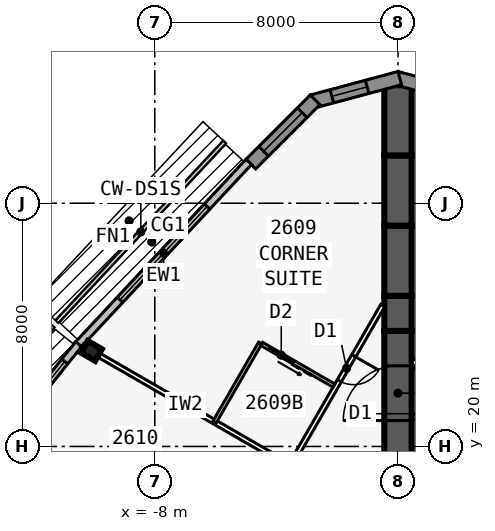
"""IFC4 building model, lengths in metres.
Left out: names, types, materials, properties, quantities, classifications, styles, units other than length and angle.
Written with IfcOpenShell. Run it as: python <this file> out.ifc"""

import sys

from ifc_helpers import new_model, si_unit, direction, frame, frame_2d, origin, origin_2d, place, context, subcontext, project, spatial, polyline, rectangle, i_section, outline, extrude, element, fill, save


model = new_model("IFC4")
c1 = context("Model", 3, precision=1e-05, world=origin(), true_north=direction((0.0, 1.0)))
c2 = subcontext(c1, "Body", "Model", "MODEL_VIEW")
j1 = project(units=[si_unit("LENGTHUNIT", "METRE"), si_unit("PLANEANGLEUNIT", "RADIAN")], contexts=[c1])
p1 = place(None, origin())
s1 = spatial("IfcSite", under=j1, at=p1, CompositionType="ELEMENT")
p2 = place(p1, origin())
s2 = spatial("IfcBuilding", under=s1, at=p2, CompositionType="ELEMENT")
p3 = place(p2, frame((0.0, 0.0, 99.9)))
s3 = spatial("IfcBuildingStorey", under=s2, at=p3, CompositionType="ELEMENT", Elevation=99.9)
p4 = place(p3, frame((0.0, 19.052, 0.0), z_axis=(0.0, 0.0, 1.0), x_axis=(0.0, 1.0, 0.0)))
e1 = element("IfcWall", 1, at=p4, inside=s3, PredefinedType="SHEAR", context=c2, shape_type="SweptSolid", body=[
    extrude(rectangle(XDim=4.746, YDim=0.9, at=frame_2d((2.373, 0.0))), origin(), (0.0, 0.0, 1.0), 3.4),
])
p5 = place(p4, frame((1.8, 0.0, 0.0)))
e2 = element("IfcOpeningElement", 2, at=p5, cuts=e1, PredefinedType="OPENING", context=c2, shape_type="SweptSolid", body=[
    extrude(rectangle(XDim=1.8, YDim=2.13, at=frame_2d((0.9, 1.065))), frame((0.0, 0.46, 0.0), z_axis=(0.0, -1.0, 0.0), x_axis=(1.0, 0.0, 0.0)), (0.0, 0.0, 1.0), 0.92),
])
p6 = place(p3, frame((0.0, 23.799, 0.0), z_axis=(0.0, 0.0, 1.0), x_axis=(0.0, 1.0, 0.0)))
e3 = element("IfcWall", 3, at=p6, inside=s3, PredefinedType="SHEAR", context=c2, shape_type="SweptSolid", body=[
    extrude(rectangle(XDim=1.155, YDim=0.9, at=frame_2d((0.577, 0.0))), origin(), (0.0, 0.0, 1.0), 3.4),
])
p7 = place(p3, frame((0.0, 24.953, 0.0), z_axis=(0.0, 0.0, 1.0), x_axis=(0.0, 1.0, 0.0)))
e4 = element("IfcWall", 4, at=p7, inside=s3, PredefinedType="SHEAR", context=c2, shape_type="SweptSolid", body=[
    extrude(rectangle(XDim=2.309, YDim=0.9, at=frame_2d((1.155, 0.0))), origin(), (0.0, 0.0, 1.0), 3.4),
])
p8 = place(p3, frame((0.0, 27.263, 0.0), z_axis=(0.0, 0.0, 1.0), x_axis=(0.0, 1.0, 0.0)))
e5 = element("IfcWall", 5, at=p8, inside=s3, PredefinedType="SHEAR", context=c2, shape_type="SweptSolid", body=[
    extrude(rectangle(XDim=2.31, YDim=0.9, at=frame_2d((1.155, 0.0))), origin(), (0.0, 0.0, 1.0), 3.4),
])
p9 = place(p3, frame((0.0, 29.572, 0.0), z_axis=(0.0, 0.0, 1.0), x_axis=(0.0, 1.0, 0.0)))
e6 = element("IfcWall", 6, at=p9, inside=s3, PredefinedType="SHEAR", context=c2, shape_type="SweptSolid", body=[
    extrude(rectangle(XDim=2.309, YDim=0.9, at=frame_2d((1.155, 0.0))), origin(), (0.0, 0.0, 1.0), 3.4),
])
p10 = place(p3, frame((-10.083, 23.142, 0.0), z_axis=(0.0, 0.0, 1.0), x_axis=(-0.5, -0.866025403784, 0.0)))
e7 = element("IfcColumn", 7, at=p10, inside=s3, PredefinedType="COLUMN", context=c2, shape_type="SweptSolid", body=[
    extrude(i_section(OverallWidth=0.442, OverallDepth=0.531, WebThickness=0.066, FlangeThickness=0.106, at=origin_2d()), origin(), (0.0, 0.0, 1.0), 3.4),
])
p11 = place(p3, frame((2.829, 31.341, 0.0), z_axis=(0.0, 0.0, 1.0), x_axis=(-0.965930548995, 0.258801419081, 0.0)))
e8 = element("IfcWall", 8, at=p11, inside=s3, PredefinedType="SOLIDWALL", context=c2, shape_type="SweptSolid", body=[
    extrude(outline(polyline([(2.989, 0.225), (2.929, 0.225), (2.438, 0.093), (2.402, 0.225), (0.0, 0.225), (0.0, -0.225), (2.989, -0.225), (2.989, 0.225)])), origin(), (0.0, 0.0, 1.0), 3.15),
])
p12 = place(p11, frame((0.676, 0.0, 0.45)))
e9 = element("IfcOpeningElement", 9, at=p12, cuts=e8, PredefinedType="OPENING", context=c2, shape_type="SweptSolid", body=[
    extrude(rectangle(XDim=1.2, YDim=2.4, at=frame_2d((0.6, 1.2))), frame((0.0, 0.235, 0.0), z_axis=(0.0, -1.0, 0.0), x_axis=(1.0, 0.0, 0.0)), (0.0, 0.0, 1.0), 0.47),
])
p13 = place(p3, frame((0.058, 32.114, 0.0), z_axis=(0.0, 0.0, 1.0), x_axis=(-0.965930548995, -0.258801419081, 0.0)))
e10 = element("IfcWall", 10, at=p13, inside=s3, PredefinedType="SOLIDWALL", context=c2, shape_type="SweptSolid", body=[
    extrude(outline(polyline([(2.989, 0.225), (0.586, 0.225), (0.551, 0.093), (0.059, 0.225), (0.0, 0.225), (0.0, -0.225), (2.989, -0.225), (2.989, 0.225)])), origin(), (0.0, 0.0, 1.0), 3.15),
])
p14 = place(p13, frame((1.113, 0.0, 0.45)))
e11 = element("IfcOpeningElement", 11, at=p14, cuts=e10, PredefinedType="OPENING", context=c2, shape_type="SweptSolid", body=[
    extrude(rectangle(XDim=1.2, YDim=2.4, at=frame_2d((0.6, 1.2))), frame((0.0, 0.235, 0.0), z_axis=(0.0, -1.0, 0.0), x_axis=(1.0, 0.0, 0.0)), (0.0, 0.0, 1.0), 0.47),
])
p15 = place(p3, frame((-2.728, 31.399, 0.0), z_axis=(0.0, 0.0, 1.0), x_axis=(-0.707106781187, -0.707106781187, 0.0)))
e12 = element("IfcWall", 12, at=p15, inside=s3, PredefinedType="SOLIDWALL", context=c2, shape_type="SweptSolid", body=[
    extrude(rectangle(XDim=2.988, YDim=0.45, at=frame_2d((1.494, 0.0))), origin(), (0.0, 0.0, 1.0), 3.15),
])
p16 = place(p15, frame((0.594, 0.0, 0.45)))
e13 = element("IfcOpeningElement", 13, at=p16, cuts=e12, PredefinedType="OPENING", context=c2, shape_type="SweptSolid", body=[
    extrude(rectangle(XDim=1.8, YDim=2.4, at=frame_2d((0.9, 1.2))), frame((0.0, 0.235, 0.0), z_axis=(0.0, -1.0, 0.0), x_axis=(1.0, 0.0, 0.0)), (0.0, 0.0, 1.0), 0.47),
])
p17 = place(p3, frame((-4.909, 29.36, 0.0), z_axis=(0.0, 0.0, 1.0), x_axis=(-0.682289646561, -0.731081964075, 0.0)))
e14 = element("IfcWall", 14, at=p17, inside=s3, PredefinedType="STANDARD", context=c2, shape_type="SweptSolid", body=[
    extrude(rectangle(XDim=8.211, YDim=0.25, at=frame_2d((4.105, 0.0))), origin(), (0.0, 0.0, 1.0), 3.15),
])
p18 = place(p17, frame((2.006, 0.0, 0.45)))
e15 = element("IfcOpeningElement", 15, at=p18, cuts=e14, PredefinedType="OPENING", context=c2, shape_type="SweptSolid", body=[
    extrude(rectangle(XDim=4.2, YDim=2.4, at=frame_2d((2.1, 1.2))), frame((0.0, 0.135, 0.0), z_axis=(0.0, -1.0, 0.0), x_axis=(1.0, 0.0, 0.0)), (0.0, 0.0, 1.0), 0.27),
])
p19 = place(p3, frame((-10.505, 23.364, 0.0), z_axis=(0.0, 0.0, 1.0), x_axis=(-0.624594965756, -0.780948864364, 0.0)))
e16 = element("IfcWall", 16, at=p19, inside=s3, PredefinedType="STANDARD", context=c2, shape_type="SweptSolid", body=[
    extrude(rectangle(XDim=5.058, YDim=0.25, at=frame_2d((2.529, 0.0))), origin(), (0.0, 0.0, 1.0), 3.15),
])
p20 = place(p19, frame((0.729, 0.0, 0.45)))
e17 = element("IfcOpeningElement", 17, at=p20, cuts=e16, PredefinedType="OPENING", context=c2, shape_type="SweptSolid", body=[
    extrude(rectangle(XDim=3.6, YDim=2.4, at=frame_2d((1.8, 1.2))), frame((0.0, 0.135, 0.0), z_axis=(0.0, -1.0, 0.0), x_axis=(1.0, 0.0, 0.0)), (0.0, 0.0, 1.0), 0.27),
])
p21 = place(p3, frame((20.027, -10.985, 0.0), z_axis=(0.0, 0.0, 1.0), x_axis=(-0.500001677587, 0.866024435227, 0.0)))
e18 = element("IfcWall", 18, at=p21, inside=s3, PredefinedType="PARTITIONING", context=c2, shape_type="SweptSolid", body=[
    extrude(rectangle(XDim=39.054, YDim=0.15, at=frame_2d((19.527, 0.0))), origin(), (0.0, 0.0, 1.0), 3.15),
])
p22 = place(p21, frame((1.558, 0.0, 0.0)))
e19 = element("IfcOpeningElement", 19, at=p22, cuts=e18, PredefinedType="OPENING", context=c2, shape_type="SweptSolid", body=[
    extrude(rectangle(XDim=0.95, YDim=2.13, at=frame_2d((0.475, 1.065))), frame((0.0, 0.085, 0.0), z_axis=(0.0, -1.0, 0.0), x_axis=(1.0, 0.0, 0.0)), (0.0, 0.0, 1.0), 0.17),
])
p23 = place(p21, frame((11.552, 0.0, 0.0)))
e20 = element("IfcOpeningElement", 20, at=p23, cuts=e18, PredefinedType="OPENING", context=c2, shape_type="SweptSolid", body=[
    extrude(rectangle(XDim=0.95, YDim=2.13, at=frame_2d((0.475, 1.065))), frame((0.0, 0.085, 0.0), z_axis=(0.0, -1.0, 0.0), x_axis=(1.0, 0.0, 0.0)), (0.0, 0.0, 1.0), 0.17),
])
p24 = place(p21, frame((22.752, 0.0, 0.0)))
e21 = element("IfcOpeningElement", 21, at=p24, cuts=e18, PredefinedType="OPENING", context=c2, shape_type="SweptSolid", body=[
    extrude(rectangle(XDim=0.95, YDim=2.13, at=frame_2d((0.475, 1.065))), frame((0.0, 0.085, 0.0), z_axis=(0.0, -1.0, 0.0), x_axis=(1.0, 0.0, 0.0)), (0.0, 0.0, 1.0), 0.17),
])
p25 = place(p21, frame((36.546, 0.0, 0.0)))
e22 = element("IfcOpeningElement", 22, at=p25, cuts=e18, PredefinedType="OPENING", context=c2, shape_type="SweptSolid", body=[
    extrude(rectangle(XDim=0.95, YDim=2.13, at=frame_2d((0.475, 1.065))), frame((0.0, 0.085, 0.0), z_axis=(0.0, -1.0, 0.0), x_axis=(1.0, 0.0, 0.0)), (0.0, 0.0, 1.0), 0.17),
])
p26 = place(p3, frame((-0.5, 24.636, 0.0), z_axis=(0.0, 0.0, 1.0), x_axis=(-0.500001915564, -0.86602429783, 0.0)))
e23 = element("IfcWall", 23, at=p26, inside=s3, PredefinedType="PARTITIONING", context=c2, shape_type="SweptSolid", body=[
    extrude(rectangle(XDim=42.172, YDim=0.15, at=frame_2d((21.086, 0.0))), origin(), (0.0, 0.0, 1.0), 3.15),
])
p27 = place(p26, frame((1.911, 0.0, 0.0)))
e24 = element("IfcOpeningElement", 24, at=p27, cuts=e23, PredefinedType="OPENING", context=c2, shape_type="SweptSolid", body=[
    extrude(rectangle(XDim=0.95, YDim=2.13, at=frame_2d((0.475, 1.065))), frame((0.0, 0.085, 0.0), z_axis=(0.0, -1.0, 0.0), x_axis=(1.0, 0.0, 0.0)), (0.0, 0.0, 1.0), 0.17),
])
p28 = place(p26, frame((8.111, 0.0, 0.0)))
e25 = element("IfcOpeningElement", 25, at=p28, cuts=e23, PredefinedType="OPENING", context=c2, shape_type="SweptSolid", body=[
    extrude(rectangle(XDim=0.95, YDim=2.13, at=frame_2d((0.475, 1.065))), frame((0.0, 0.085, 0.0), z_axis=(0.0, -1.0, 0.0), x_axis=(1.0, 0.0, 0.0)), (0.0, 0.0, 1.0), 0.17),
])
p29 = place(p26, frame((18.111, 0.0, 0.0)))
e26 = element("IfcOpeningElement", 26, at=p29, cuts=e23, PredefinedType="OPENING", context=c2, shape_type="SweptSolid", body=[
    extrude(rectangle(XDim=0.95, YDim=2.13, at=frame_2d((0.475, 1.065))), frame((0.0, 0.085, 0.0), z_axis=(0.0, -1.0, 0.0), x_axis=(1.0, 0.0, 0.0)), (0.0, 0.0, 1.0), 0.17),
])
p30 = place(p26, frame((28.711, 0.0, 0.0)))
e27 = element("IfcOpeningElement", 27, at=p30, cuts=e23, PredefinedType="OPENING", context=c2, shape_type="SweptSolid", body=[
    extrude(rectangle(XDim=0.95, YDim=2.13, at=frame_2d((0.475, 1.065))), frame((0.0, 0.085, 0.0), z_axis=(0.0, -1.0, 0.0), x_axis=(1.0, 0.0, 0.0)), (0.0, 0.0, 1.0), 0.17),
])
p31 = place(p26, frame((33.711, 0.0, 0.0)))
e28 = element("IfcOpeningElement", 28, at=p31, cuts=e23, PredefinedType="OPENING", context=c2, shape_type="SweptSolid", body=[
    extrude(rectangle(XDim=0.95, YDim=2.13, at=frame_2d((0.475, 1.065))), frame((0.0, 0.085, 0.0), z_axis=(0.0, -1.0, 0.0), x_axis=(1.0, 0.0, 0.0)), (0.0, 0.0, 1.0), 0.17),
])
p32 = place(p26, frame((39.311, 0.0, 0.0)))
e29 = element("IfcOpeningElement", 29, at=p32, cuts=e23, PredefinedType="OPENING", context=c2, shape_type="SweptSolid", body=[
    extrude(rectangle(XDim=0.95, YDim=2.13, at=frame_2d((0.475, 1.065))), frame((0.0, 0.085, 0.0), z_axis=(0.0, -1.0, 0.0), x_axis=(1.0, 0.0, 0.0)), (0.0, 0.0, 1.0), 0.17),
])
p33 = place(p3, frame((-3.608, 19.404, 0.0), z_axis=(0.0, 0.0, 1.0), x_axis=(-0.866021300503, 0.500007107024, 0.0)))
e30 = element("IfcWall", 30, at=p33, inside=s3, PredefinedType="PARTITIONING", context=c2, shape_type="SweptSolid", body=[
    extrude(rectangle(XDim=7.82, YDim=0.15, at=frame_2d((3.91, 0.0))), origin(), (0.0, 0.0, 1.0), 2.05),
])
p34 = place(p3, frame((-4.533, 23.402, 0.0), z_axis=(0.0, 0.0, 1.0), x_axis=(-0.499990139034, -0.866031096941, 0.0)))
e31 = element("IfcWall", 31, at=p34, inside=s3, PredefinedType="PLUMBINGWALL", context=c2, shape_type="SweptSolid", body=[
    extrude(rectangle(XDim=3.0, YDim=0.12, at=frame_2d((1.5, 0.0))), origin(), (0.0, 0.0, 1.0), 3.15),
])
p35 = place(p3, frame((-2.108, 22.002, 0.0), z_axis=(0.0, 0.0, 1.0), x_axis=(-0.866035715982, 0.499982138324, 0.0)))
e32 = element("IfcWall", 32, at=p35, inside=s3, PredefinedType="PLUMBINGWALL", context=c2, shape_type="SweptSolid", body=[
    extrude(rectangle(XDim=2.74, YDim=0.12, at=frame_2d((1.37, 0.0))), origin(), (0.0, 0.0, 1.0), 3.15),
])
p36 = place(p35, frame((1.55, 0.0, 0.0)))
e33 = element("IfcOpeningElement", 33, at=p36, cuts=e32, PredefinedType="OPENING", context=c2, shape_type="SweptSolid", body=[
    extrude(rectangle(XDim=0.9, YDim=2.13, at=frame_2d((0.45, 1.065))), frame((0.0, 0.07, 0.0), z_axis=(0.0, -1.0, 0.0), x_axis=(1.0, 0.0, 0.0)), (0.0, 0.0, 1.0), 0.14),
])
p37 = place(p14, origin())
e34 = element("IfcWindow", 34, at=p37, inside=s3, PartitioningType="SINGLE_PANEL", PredefinedType="WINDOW", context=c2, shape_type="SweptSolid", body=[
    extrude(rectangle(XDim=1.2, YDim=2.4, at=frame_2d((0.6, 1.2))), frame((0.0, 0.03, 0.0), z_axis=(0.0, -1.0, 0.0), x_axis=(1.0, 0.0, 0.0)), (0.0, 0.0, 1.0), 0.06),
])
fill(e11, e34)
p38 = place(p16, origin())
e35 = element("IfcWindow", 35, at=p38, inside=s3, PartitioningType="SINGLE_PANEL", PredefinedType="WINDOW", context=c2, shape_type="SweptSolid", body=[
    extrude(rectangle(XDim=1.8, YDim=2.4, at=frame_2d((0.9, 1.2))), frame((0.0, 0.03, 0.0), z_axis=(0.0, -1.0, 0.0), x_axis=(1.0, 0.0, 0.0)), (0.0, 0.0, 1.0), 0.06),
])
fill(e13, e35)
p39 = place(p18, origin())
e36 = element("IfcWindow", 36, at=p39, inside=s3, PartitioningType="SINGLE_PANEL", PredefinedType="WINDOW", context=c2, shape_type="SweptSolid", body=[
    extrude(rectangle(XDim=4.2, YDim=2.4, at=frame_2d((2.1, 1.2))), frame((0.0, 0.03, 0.0), z_axis=(0.0, -1.0, 0.0), x_axis=(1.0, 0.0, 0.0)), (0.0, 0.0, 1.0), 0.06),
])
fill(e15, e36)
p40 = place(p20, origin())
e37 = element("IfcWindow", 37, at=p40, inside=s3, PartitioningType="SINGLE_PANEL", PredefinedType="WINDOW", context=c2, shape_type="SweptSolid", body=[
    extrude(rectangle(XDim=3.6, YDim=2.4, at=frame_2d((1.8, 1.2))), frame((0.0, 0.03, 0.0), z_axis=(0.0, -1.0, 0.0), x_axis=(1.0, 0.0, 0.0)), (0.0, 0.0, 1.0), 0.06),
])
fill(e17, e37)
p41 = place(p36, origin())
e38 = element("IfcDoor", 38, at=p41, inside=s3, OperationType="SLIDING_TO_LEFT", PredefinedType="DOOR", context=c2, shape_type="SweptSolid", body=[
    extrude(rectangle(XDim=0.9, YDim=2.13, at=frame_2d((0.45, 1.065))), frame((0.0, 0.025, 0.0), z_axis=(0.0, -1.0, 0.0), x_axis=(1.0, 0.0, 0.0)), (0.0, 0.0, 1.0), 0.05),
])
fill(e33, e38)
p42 = place(p27, origin())
e39 = element("IfcDoor", 39, at=p42, inside=s3, OperationType="SINGLE_SWING_LEFT", PredefinedType="DOOR", context=c2, shape_type="SweptSolid", body=[
    extrude(rectangle(XDim=0.95, YDim=2.13, at=frame_2d((0.475, 1.065))), frame((0.0, 0.025, 0.0), z_axis=(0.0, -1.0, 0.0), x_axis=(1.0, 0.0, 0.0)), (0.0, 0.0, 1.0), 0.05),
])
fill(e24, e39)
p43 = place(p5, origin())
e40 = element("IfcDoor", 40, at=p43, inside=s3, OperationType="DOUBLE_DOOR_DOUBLE_SWING", PredefinedType="DOOR", context=c2, shape_type="SweptSolid", body=[
    extrude(rectangle(XDim=1.8, YDim=2.13, at=frame_2d((0.9, 1.065))), frame((0.0, 0.025, 0.0), z_axis=(0.0, -1.0, 0.0), x_axis=(1.0, 0.0, 0.0)), (0.0, 0.0, 1.0), 0.05),
])
fill(e2, e40)
save(model, sys.argv[1])
